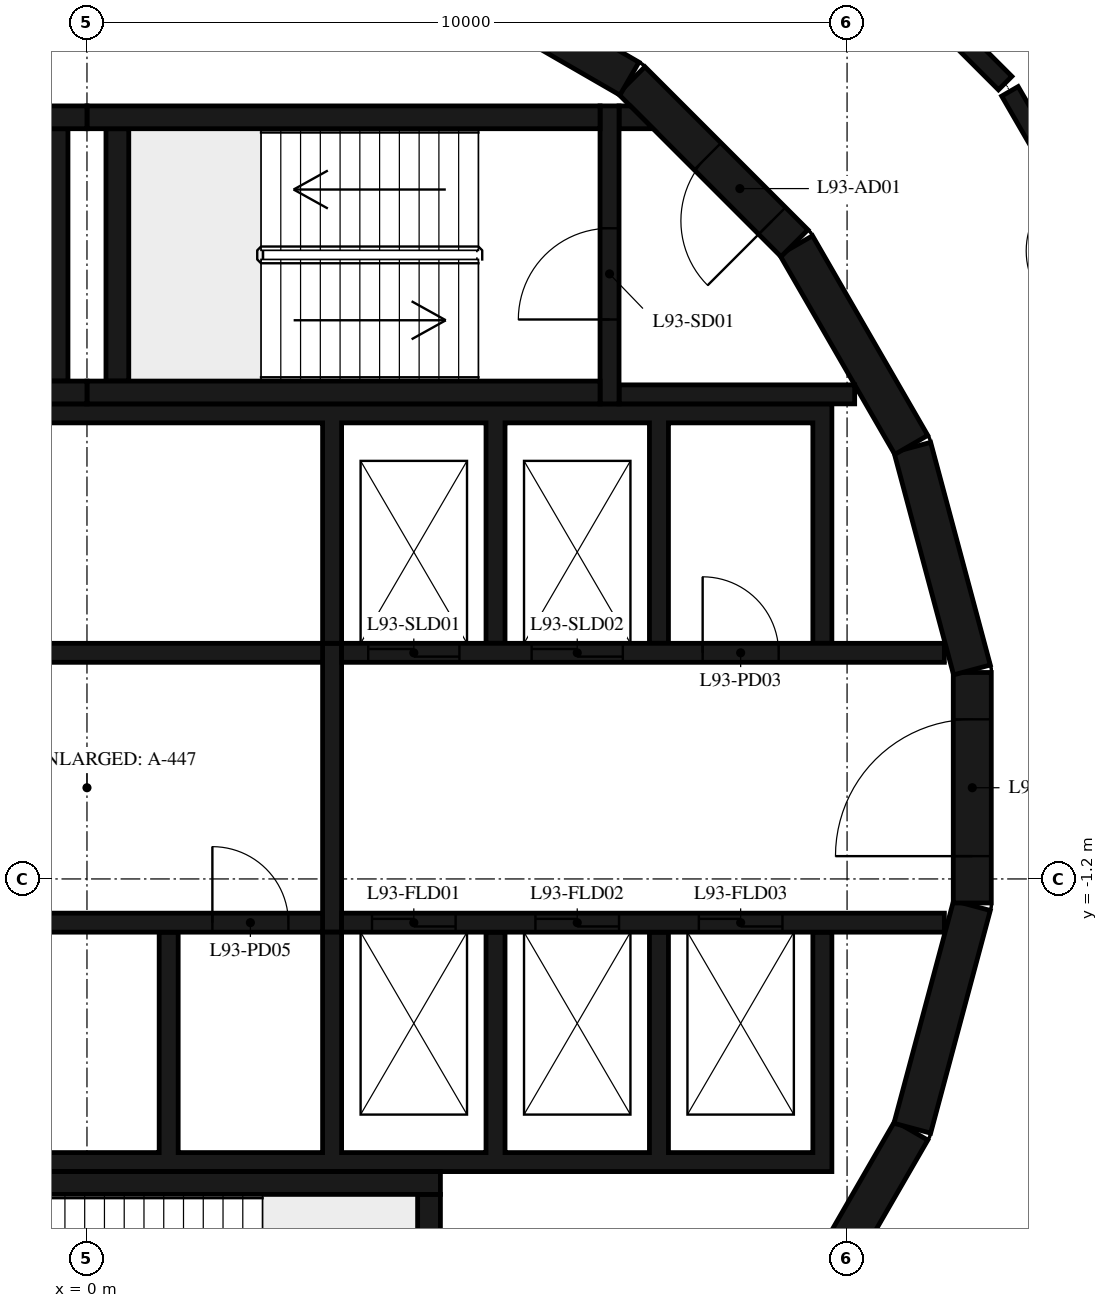
"""IFC4 building model, lengths in metres.
Left out: names, types, materials, properties, quantities, classifications, styles, units other than length and angle.
Written with IfcOpenShell. Run it as: python <this file> out.ifc"""

import sys

from ifc_helpers import new_model, si_unit, direction, frame, frame_2d, origin, place, context, subcontext, project, spatial, polyline, rectangle, outline, extrude, element, fill, save


model = new_model("IFC4")
c1 = context("Model", 3, precision=1e-05, world=origin(), true_north=direction((0.0, 1.0)))
c2 = subcontext(c1, "Body", "Model", "MODEL_VIEW")
j1 = project(units=[si_unit("LENGTHUNIT", "METRE"), si_unit("PLANEANGLEUNIT", "RADIAN")], contexts=[c1])
p1 = place(None, origin())
s1 = spatial("IfcSite", under=j1, at=p1, CompositionType="ELEMENT")
p2 = place(p1, origin())
s2 = spatial("IfcBuilding", under=s1, at=p2, CompositionType="ELEMENT")
p3 = place(p2, frame((0.0, 0.0, 361.0)))
s3 = spatial("IfcBuildingStorey", under=s2, at=p3, CompositionType="ELEMENT", Elevation=361.0)
for number, where, z_axis, x_axis in (
    (1, (9.329, -7.137, 0.0), (0.0, 0.0, 1.0), (0.5, 0.866, 0.0)),
    (2, (10.858, -4.479, 0.0), (0.0, 0.0, 1.0), (0.259, 0.966, 0.0)),
):
    element("IfcWall", number, at=place(p3, frame(where, z_axis=z_axis, x_axis=x_axis)), inside=s3, PredefinedType="SHEAR", context=c2, shape_type="SweptSolid", body=[
        extrude(rectangle(XDim=3.033, YDim=0.5, at=frame_2d((1.516, 0.0))), origin(), (0.0, 0.0, 1.0), 4.82),
    ])
p4 = place(p3, frame((11.647, -1.516, 0.0), z_axis=(0.0, 0.0, 1.0), x_axis=(0.0, 1.0, 0.0)))
e3 = element("IfcWall", 3, at=p4, inside=s3, PredefinedType="SHEAR", context=c2, shape_type="SweptSolid", body=[
    extrude(rectangle(XDim=3.033, YDim=0.5, at=frame_2d((1.516, 0.0))), origin(), (0.0, 0.0, 1.0), 4.82),
])
p5 = place(p4, frame((0.616, 0.0, 0.0)))
e4 = element("IfcOpeningElement", 4, at=p5, cuts=e3, PredefinedType="OPENING", context=c2, shape_type="SweptSolid", body=[
    extrude(rectangle(XDim=1.8, YDim=2.1, at=frame_2d((0.9, 1.05))), frame((0.0, 0.26, 0.0), z_axis=(0.0, -1.0, 0.0), x_axis=(1.0, 0.0, 0.0)), (0.0, 0.0, 1.0), 0.52),
])
for number, where, z_axis, x_axis in (
    (5, (11.643, 1.55, 0.0), (0.0, 0.0, 1.0), (-0.259, 0.966, 0.0)),
    (6, (10.845, 4.51, 0.0), (0.0, 0.0, 1.0), (-0.5, 0.866, 0.0)),
):
    element("IfcWall", number, at=place(p3, frame(where, z_axis=z_axis, x_axis=x_axis)), inside=s3, PredefinedType="SHEAR", context=c2, shape_type="SweptSolid", body=[
        extrude(rectangle(XDim=3.033, YDim=0.5, at=frame_2d((1.516, 0.0))), origin(), (0.0, 0.0, 1.0), 4.82),
    ])
p6 = place(p3, frame((9.308, 7.164, 0.0), z_axis=(0.0, 0.0, 1.0), x_axis=(-0.707106781187, 0.707106781187, 0.0)))
e7 = element("IfcWall", 7, at=p6, inside=s3, PredefinedType="SHEAR", context=c2, shape_type="SweptSolid", body=[
    extrude(rectangle(XDim=3.032, YDim=0.5, at=frame_2d((1.516, 0.0))), origin(), (0.0, 0.0, 1.0), 4.82),
])
p7 = place(p6, frame((0.416, 0.0, 0.0)))
e8 = element("IfcOpeningElement", 8, at=p7, cuts=e7, PredefinedType="OPENING", context=c2, shape_type="SweptSolid", body=[
    extrude(rectangle(XDim=1.2, YDim=2.1, at=frame_2d((0.6, 1.05))), frame((0.0, 0.26, 0.0), z_axis=(0.0, -1.0, 0.0), x_axis=(1.0, 0.0, 0.0)), (0.0, 0.0, 1.0), 0.52),
])
p8 = place(p3, frame((7.137, 9.329, 0.0), z_axis=(0.0, 0.0, 1.0), x_axis=(-0.865975092491, 0.500087131594, 0.0)))
e9 = element("IfcWall", 9, at=p8, inside=s3, PredefinedType="SHEAR", context=c2, shape_type="SweptSolid", body=[
    extrude(rectangle(XDim=3.033, YDim=0.5, at=frame_2d((1.516, 0.0))), origin(), (0.0, 0.0, 1.0), 4.82),
])
for number, where, z_axis, x_axis in (
    (10, (0.0, 5.2, 0.0), (0.0, 0.0, 1.0), (1.0, 0.0, 0.0)),
    (11, (0.0, 8.82, 0.0), (0.0, 0.0, 1.0), (1.0, 0.0, 0.0)),
):
    element("IfcWall", number, at=place(p3, frame(where, z_axis=z_axis, x_axis=x_axis)), inside=s3, PredefinedType="SHEAR", context=c2, shape_type="SweptSolid", body=[
        extrude(rectangle(XDim=6.75, YDim=0.3, at=frame_2d((3.375, 0.0))), origin(), (0.0, 0.0, 1.0), 4.82),
    ])
p9 = place(p3, frame((0.4, 5.35, 0.0), z_axis=(0.0, 0.0, 1.0), x_axis=(0.0, 1.0, 0.0)))
e12 = element("IfcWall", 12, at=p9, inside=s3, PredefinedType="SHEAR", context=c2, shape_type="SweptSolid", body=[
    extrude(rectangle(XDim=3.32, YDim=0.3, at=frame_2d((1.66, 0.0))), origin(), (0.0, 0.0, 1.0), 4.82),
])
p10 = place(p3, frame((6.875, 5.05, 0.0), z_axis=(0.0, 0.0, 1.0), x_axis=(0.0, 1.0, 0.0)))
e13 = element("IfcWall", 13, at=p10, inside=s3, PredefinedType="SHEAR", context=c2, shape_type="SweptSolid", body=[
    extrude(rectangle(XDim=3.92, YDim=0.25, at=frame_2d((1.96, 0.0))), origin(), (0.0, 0.0, 1.0), 4.82),
])
p11 = place(p10, frame((1.11, 0.0, 0.0)))
e14 = element("IfcOpeningElement", 14, at=p11, cuts=e13, PredefinedType="OPENING", context=c2, shape_type="SweptSolid", body=[
    extrude(rectangle(XDim=1.2, YDim=2.1, at=frame_2d((0.6, 1.05))), frame((0.0, 0.135, 0.0), z_axis=(0.0, -1.0, 0.0), x_axis=(1.0, 0.0, 0.0)), (0.0, 0.0, 1.0), 0.27),
])
p12 = place(p3, frame((7.0, 5.175, 0.0), z_axis=(0.0, 0.0, 1.0), x_axis=(1.0, 0.0, 0.0)))
e15 = element("IfcWall", 15, at=p12, inside=s3, PredefinedType="SHEAR", context=c2, shape_type="SweptSolid", body=[
    extrude(rectangle(XDim=3.1, YDim=0.25, at=frame_2d((1.55, 0.0))), origin(), (0.0, 0.0, 1.0), 4.82),
])
p13 = place(p3, origin())
e16 = element("IfcWall", 16, at=p13, inside=s3, PredefinedType="SHEAR", context=c2, shape_type="SweptSolid", body=[
    extrude(outline(polyline([(7.448, 8.67), (7.0, 8.67), (7.0, 8.97), (7.148, 8.97), (7.448, 8.67)])), origin(), (0.0, 0.0, 1.0), 4.82),
])
for number, where, z_axis, x_axis in (
    (17, (-6.75, 5.2, 0.0), (0.0, 0.0, 1.0), (1.0, 0.0, 0.0)),
    (18, (-6.75, 8.82, 0.0), (0.0, 0.0, 1.0), (1.0, 0.0, 0.0)),
):
    element("IfcWall", number, at=place(p3, frame(where, z_axis=z_axis, x_axis=x_axis)), inside=s3, PredefinedType="SHEAR", context=c2, shape_type="SweptSolid", body=[
        extrude(rectangle(XDim=6.75, YDim=0.3, at=frame_2d((3.375, 0.0))), origin(), (0.0, 0.0, 1.0), 4.82),
    ])
p14 = place(p3, frame((-0.4, 5.35, 0.0), z_axis=(0.0, 0.0, 1.0), x_axis=(0.0, 1.0, 0.0)))
e19 = element("IfcWall", 19, at=p14, inside=s3, PredefinedType="SHEAR", context=c2, shape_type="SweptSolid", body=[
    extrude(rectangle(XDim=3.32, YDim=0.3, at=frame_2d((1.66, 0.0))), origin(), (0.0, 0.0, 1.0), 4.82),
])
p15 = place(p3, frame((-2.4, -5.2, 0.0), z_axis=(0.0, 0.0, 1.0), x_axis=(1.0, 0.0, 0.0)))
e20 = element("IfcWall", 20, at=p15, inside=s3, PredefinedType="SHEAR", context=c2, shape_type="SweptSolid", body=[
    extrude(rectangle(XDim=7.05, YDim=0.3, at=frame_2d((3.525, 0.0))), origin(), (0.0, 0.0, 1.0), 4.82),
])
p16 = place(p3, frame((4.5, -8.67, 0.0), z_axis=(0.0, 0.0, 1.0), x_axis=(0.0, 1.0, 0.0)))
e21 = element("IfcWall", 21, at=p16, inside=s3, PredefinedType="SHEAR", context=c2, shape_type="SweptSolid", body=[
    extrude(rectangle(XDim=3.32, YDim=0.3, at=frame_2d((1.66, 0.0))), origin(), (0.0, 0.0, 1.0), 4.82),
])
p17 = place(p3, origin())
e22 = element("IfcWall", 22, at=p17, inside=s3, PredefinedType="SHEAR", context=c2, shape_type="SweptSolid", body=[
    extrude(outline(polyline([(-9.8, 1.9), (-9.55, 1.9), (-9.55, 4.8), (-5.5, 4.8), (-5.5, 1.9), (-5.25, 1.9), (-5.25, 4.8), (3.1, 4.8), (3.1, 1.9), (3.35, 1.9), (3.35, 4.8), (5.25, 4.8), (5.25, 1.9), (5.5, 1.9), (5.5, 4.8), (7.4, 4.8), (7.4, 1.9), (7.65, 1.9), (7.65, 4.8), (9.55, 4.8), (9.55, 1.9), (9.8, 1.9), (9.8, 4.8), (9.8, 5.05), (-9.8, 5.05), (-9.8, 4.8), (-9.8, 1.9)])), origin(), (0.0, 0.0, 1.0), 4.82),
])
p18 = place(p3, origin())
e23 = element("IfcWall", 23, at=p18, inside=s3, PredefinedType="SHEAR", context=c2, shape_type="SweptSolid", body=[
    extrude(outline(polyline([(9.8, -5.05), (9.8, -4.8), (9.8, -1.9), (9.55, -1.9), (9.55, -4.8), (7.65, -4.8), (7.65, -1.9), (7.4, -1.9), (7.4, -4.8), (5.5, -4.8), (5.5, -1.9), (5.25, -1.9), (5.25, -4.8), (3.35, -4.8), (3.35, -1.9), (3.1, -1.9), (3.1, -4.8), (1.2, -4.8), (1.2, -1.9), (0.95, -1.9), (0.95, -4.8), (-0.95, -4.8), (-0.95, -1.9), (-1.2, -1.9), (-1.2, -4.8), (-3.1, -4.8), (-3.1, -1.9), (-3.35, -1.9), (-3.35, -4.8), (-5.25, -4.8), (-5.25, -1.9), (-5.5, -1.9), (-5.5, -4.8), (-9.55, -4.8), (-9.55, -1.9), (-9.8, -1.9), (-9.8, -4.8), (-9.8, -5.05), (9.8, -5.05)])), origin(), (0.0, 0.0, 1.0), 4.82),
])
p19 = place(p3, frame((-11.28, 1.775, 0.0), z_axis=(0.0, 0.0, 1.0), x_axis=(1.0, 0.0, 0.0)))
e24 = element("IfcWall", 24, at=p19, inside=s3, PredefinedType="SHEAR", context=c2, shape_type="SweptSolid", body=[
    extrude(rectangle(XDim=14.38, YDim=0.25, at=frame_2d((7.19, 0.0))), origin(), (0.0, 0.0, 1.0), 4.82),
])
p20 = place(p19, frame((3.255, 0.0, 0.0)))
e25 = element("IfcOpeningElement", 25, at=p20, cuts=e24, PredefinedType="OPENING", context=c2, shape_type="SweptSolid", body=[
    extrude(rectangle(XDim=1.0, YDim=2.4, at=frame_2d((0.5, 1.2))), frame((0.0, 0.135, 0.0), z_axis=(0.0, -1.0, 0.0), x_axis=(1.0, 0.0, 0.0)), (0.0, 0.0, 1.0), 0.27),
])
p21 = place(p19, frame((9.705, 0.0, 0.0)))
e26 = element("IfcOpeningElement", 26, at=p21, cuts=e24, PredefinedType="OPENING", context=c2, shape_type="SweptSolid", body=[
    extrude(rectangle(XDim=1.0, YDim=2.4, at=frame_2d((0.5, 1.2))), frame((0.0, 0.135, 0.0), z_axis=(0.0, -1.0, 0.0), x_axis=(1.0, 0.0, 0.0)), (0.0, 0.0, 1.0), 0.27),
])
p22 = place(p3, frame((3.35, 1.775, 0.0), z_axis=(0.0, 0.0, 1.0), x_axis=(1.0, 0.0, 0.0)))
e27 = element("IfcWall", 27, at=p22, inside=s3, PredefinedType="SHEAR", context=c2, shape_type="SweptSolid", body=[
    extrude(rectangle(XDim=7.93, YDim=0.25, at=frame_2d((3.965, 0.0))), origin(), (0.0, 0.0, 1.0), 4.82),
])
p23 = place(p22, frame((0.35, 0.0, 0.0)))
e28 = element("IfcOpeningElement", 28, at=p23, cuts=e27, PredefinedType="OPENING", context=c2, shape_type="SweptSolid", body=[
    extrude(rectangle(XDim=1.2, YDim=2.4, at=frame_2d((0.6, 1.2))), frame((0.0, 0.135, 0.0), z_axis=(0.0, -1.0, 0.0), x_axis=(1.0, 0.0, 0.0)), (0.0, 0.0, 1.0), 0.27),
])
p24 = place(p22, frame((2.5, 0.0, 0.0)))
e29 = element("IfcOpeningElement", 29, at=p24, cuts=e27, PredefinedType="OPENING", context=c2, shape_type="SweptSolid", body=[
    extrude(rectangle(XDim=1.2, YDim=2.4, at=frame_2d((0.6, 1.2))), frame((0.0, 0.135, 0.0), z_axis=(0.0, -1.0, 0.0), x_axis=(1.0, 0.0, 0.0)), (0.0, 0.0, 1.0), 0.27),
])
p25 = place(p22, frame((4.75, 0.0, 0.0)))
e30 = element("IfcOpeningElement", 30, at=p25, cuts=e27, PredefinedType="OPENING", context=c2, shape_type="SweptSolid", body=[
    extrude(rectangle(XDim=1.0, YDim=2.4, at=frame_2d((0.5, 1.2))), frame((0.0, 0.135, 0.0), z_axis=(0.0, -1.0, 0.0), x_axis=(1.0, 0.0, 0.0)), (0.0, 0.0, 1.0), 0.27),
])
p26 = place(p3, frame((-11.28, -1.775, 0.0), z_axis=(0.0, 0.0, 1.0), x_axis=(1.0, 0.0, 0.0)))
e31 = element("IfcWall", 31, at=p26, inside=s3, PredefinedType="SHEAR", context=c2, shape_type="SweptSolid", body=[
    extrude(rectangle(XDim=14.38, YDim=0.25, at=frame_2d((7.19, 0.0))), origin(), (0.0, 0.0, 1.0), 4.82),
])
p27 = place(p26, frame((3.255, 0.0, 0.0)))
e32 = element("IfcOpeningElement", 32, at=p27, cuts=e31, PredefinedType="OPENING", context=c2, shape_type="SweptSolid", body=[
    extrude(rectangle(XDim=1.0, YDim=2.4, at=frame_2d((0.5, 1.2))), frame((0.0, 0.135, 0.0), z_axis=(0.0, -1.0, 0.0), x_axis=(1.0, 0.0, 0.0)), (0.0, 0.0, 1.0), 0.27),
])
p28 = place(p26, frame((12.93, 0.0, 0.0)))
e33 = element("IfcOpeningElement", 33, at=p28, cuts=e31, PredefinedType="OPENING", context=c2, shape_type="SweptSolid", body=[
    extrude(rectangle(XDim=1.0, YDim=2.4, at=frame_2d((0.5, 1.2))), frame((0.0, 0.135, 0.0), z_axis=(0.0, -1.0, 0.0), x_axis=(1.0, 0.0, 0.0)), (0.0, 0.0, 1.0), 0.27),
])
p29 = place(p3, frame((3.35, -1.775, 0.0), z_axis=(0.0, 0.0, 1.0), x_axis=(1.0, 0.0, 0.0)))
e34 = element("IfcWall", 34, at=p29, inside=s3, PredefinedType="SHEAR", context=c2, shape_type="SweptSolid", body=[
    extrude(rectangle(XDim=7.93, YDim=0.25, at=frame_2d((3.965, 0.0))), origin(), (0.0, 0.0, 1.0), 4.82),
])
p30 = place(p29, frame((0.4, 0.0, 0.0)))
e35 = element("IfcOpeningElement", 35, at=p30, cuts=e34, PredefinedType="OPENING", context=c2, shape_type="SweptSolid", body=[
    extrude(rectangle(XDim=1.1, YDim=2.4, at=frame_2d((0.55, 1.2))), frame((0.0, 0.135, 0.0), z_axis=(0.0, -1.0, 0.0), x_axis=(1.0, 0.0, 0.0)), (0.0, 0.0, 1.0), 0.27),
])
p31 = place(p29, frame((2.55, 0.0, 0.0)))
e36 = element("IfcOpeningElement", 36, at=p31, cuts=e34, PredefinedType="OPENING", context=c2, shape_type="SweptSolid", body=[
    extrude(rectangle(XDim=1.1, YDim=2.4, at=frame_2d((0.55, 1.2))), frame((0.0, 0.135, 0.0), z_axis=(0.0, -1.0, 0.0), x_axis=(1.0, 0.0, 0.0)), (0.0, 0.0, 1.0), 0.27),
])
p32 = place(p29, frame((4.7, 0.0, 0.0)))
e37 = element("IfcOpeningElement", 37, at=p32, cuts=e34, PredefinedType="OPENING", context=c2, shape_type="SweptSolid", body=[
    extrude(rectangle(XDim=1.1, YDim=2.4, at=frame_2d((0.55, 1.2))), frame((0.0, 0.135, 0.0), z_axis=(0.0, -1.0, 0.0), x_axis=(1.0, 0.0, 0.0)), (0.0, 0.0, 1.0), 0.27),
])
p33 = place(p3, frame((3.225, -1.9, 0.0), z_axis=(0.0, 0.0, 1.0), x_axis=(0.0, 1.0, 0.0)))
e38 = element("IfcWall", 38, at=p33, inside=s3, PredefinedType="SHEAR", context=c2, shape_type="SweptSolid", body=[
    extrude(rectangle(XDim=3.8, YDim=0.25, at=frame_2d((1.9, 0.0))), origin(), (0.0, 0.0, 1.0), 4.82),
])
p34 = place(p3, frame((12.143, -9.162, 0.0), z_axis=(0.0, 0.0, 1.0), x_axis=(0.500756218026, 0.865588360659, 0.0)))
e39 = element("IfcWall", 39, at=p34, inside=s3, PredefinedType="PARTITIONING", context=c2, shape_type="SweptSolid", body=[
    extrude(rectangle(XDim=3.849, YDim=0.25, at=frame_2d((1.925, 0.0))), origin(), (0.0, 0.0, 1.0), 4.82),
])
p35 = place(p3, frame((12.08, 9.27, 0.0), z_axis=(0.0, 0.0, 1.0), x_axis=(-0.707106781187, 0.707106781187, 0.0)))
e40 = element("IfcWall", 40, at=p35, inside=s3, PredefinedType="PARTITIONING", context=c2, shape_type="SweptSolid", body=[
    extrude(rectangle(XDim=2.249, YDim=0.25, at=frame_2d((1.125, 0.0))), origin(), (0.0, 0.0, 1.0), 4.82),
])
p36 = place(p3, frame((14.07, 5.83, 0.0), z_axis=(0.0, 0.0, 1.0), x_axis=(-0.500756218026, 0.865588360659, 0.0)))
e41 = element("IfcWall", 41, at=p36, inside=s3, PredefinedType="PARTITIONING", context=c2, shape_type="SweptSolid", body=[
    extrude(rectangle(XDim=3.849, YDim=0.25, at=frame_2d((1.925, 0.0))), origin(), (0.0, 0.0, 1.0), 4.82),
])
p37 = place(p36, frame((1.425, 0.0, 0.0)))
e42 = element("IfcOpeningElement", 42, at=p37, cuts=e41, PredefinedType="OPENING", context=c2, shape_type="SweptSolid", body=[
    extrude(rectangle(XDim=1.0, YDim=2.1, at=frame_2d((0.5, 1.05))), frame((0.0, 0.135, 0.0), z_axis=(0.0, -1.0, 0.0), x_axis=(1.0, 0.0, 0.0)), (0.0, 0.0, 1.0), 0.27),
])
p38 = place(p11, origin())
e43 = element("IfcDoor", 43, at=p38, inside=s3, OperationType="SINGLE_SWING_LEFT", PredefinedType="DOOR", context=c2, shape_type="SweptSolid", body=[
    extrude(rectangle(XDim=1.2, YDim=2.1, at=frame_2d((0.6, 1.05))), frame((0.0, 0.025, 0.0), z_axis=(0.0, -1.0, 0.0), x_axis=(1.0, 0.0, 0.0)), (0.0, 0.0, 1.0), 0.05),
])
fill(e14, e43)
p39 = place(p7, origin())
e44 = element("IfcDoor", 44, at=p39, inside=s3, OperationType="SINGLE_SWING_RIGHT", PredefinedType="DOOR", context=c2, shape_type="SweptSolid", body=[
    extrude(rectangle(XDim=1.2, YDim=2.1, at=frame_2d((0.6, 1.05))), frame((0.0, 0.025, 0.0), z_axis=(0.0, -1.0, 0.0), x_axis=(1.0, 0.0, 0.0)), (0.0, 0.0, 1.0), 0.05),
])
fill(e8, e44)
p40 = place(p5, origin())
e45 = element("IfcDoor", 45, at=p40, inside=s3, OperationType="DOUBLE_DOOR_SINGLE_SWING", PredefinedType="DOOR", context=c2, shape_type="SweptSolid", body=[
    extrude(rectangle(XDim=1.8, YDim=2.1, at=frame_2d((0.9, 1.05))), frame((0.0, 0.025, 0.0), z_axis=(0.0, -1.0, 0.0), x_axis=(1.0, 0.0, 0.0)), (0.0, 0.0, 1.0), 0.05),
])
fill(e4, e45)
p41 = place(p23, origin())
e46 = element("IfcDoor", 46, at=p41, inside=s3, OperationType="DOUBLE_DOOR_SLIDING", PredefinedType="DOOR", context=c2, shape_type="SweptSolid", body=[
    extrude(rectangle(XDim=1.2, YDim=2.4, at=frame_2d((0.6, 1.2))), frame((0.0, 0.025, 0.0), z_axis=(0.0, -1.0, 0.0), x_axis=(1.0, 0.0, 0.0)), (0.0, 0.0, 1.0), 0.05),
])
fill(e28, e46)
p42 = place(p24, origin())
e47 = element("IfcDoor", 47, at=p42, inside=s3, OperationType="DOUBLE_DOOR_SLIDING", PredefinedType="DOOR", context=c2, shape_type="SweptSolid", body=[
    extrude(rectangle(XDim=1.2, YDim=2.4, at=frame_2d((0.6, 1.2))), frame((0.0, 0.025, 0.0), z_axis=(0.0, -1.0, 0.0), x_axis=(1.0, 0.0, 0.0)), (0.0, 0.0, 1.0), 0.05),
])
fill(e29, e47)
p43 = place(p30, origin())
e48 = element("IfcDoor", 48, at=p43, inside=s3, OperationType="DOUBLE_DOOR_SLIDING", PredefinedType="DOOR", context=c2, shape_type="SweptSolid", body=[
    extrude(rectangle(XDim=1.1, YDim=2.4, at=frame_2d((0.55, 1.2))), frame((0.0, 0.025, 0.0), z_axis=(0.0, -1.0, 0.0), x_axis=(1.0, 0.0, 0.0)), (0.0, 0.0, 1.0), 0.05),
])
fill(e35, e48)
p44 = place(p31, origin())
e49 = element("IfcDoor", 49, at=p44, inside=s3, OperationType="DOUBLE_DOOR_SLIDING", PredefinedType="DOOR", context=c2, shape_type="SweptSolid", body=[
    extrude(rectangle(XDim=1.1, YDim=2.4, at=frame_2d((0.55, 1.2))), frame((0.0, 0.025, 0.0), z_axis=(0.0, -1.0, 0.0), x_axis=(1.0, 0.0, 0.0)), (0.0, 0.0, 1.0), 0.05),
])
fill(e36, e49)
p45 = place(p32, origin())
e50 = element("IfcDoor", 50, at=p45, inside=s3, OperationType="DOUBLE_DOOR_SLIDING", PredefinedType="DOOR", context=c2, shape_type="SweptSolid", body=[
    extrude(rectangle(XDim=1.1, YDim=2.4, at=frame_2d((0.55, 1.2))), frame((0.0, 0.025, 0.0), z_axis=(0.0, -1.0, 0.0), x_axis=(1.0, 0.0, 0.0)), (0.0, 0.0, 1.0), 0.05),
])
fill(e37, e50)
p46 = place(p25, origin())
e51 = element("IfcDoor", 51, at=p46, inside=s3, OperationType="SINGLE_SWING_RIGHT", PredefinedType="DOOR", context=c2, shape_type="SweptSolid", body=[
    extrude(rectangle(XDim=1.0, YDim=2.4, at=frame_2d((0.5, 1.2))), frame((0.0, 0.025, 0.0), z_axis=(0.0, -1.0, 0.0), x_axis=(1.0, 0.0, 0.0)), (0.0, 0.0, 1.0), 0.05),
])
fill(e30, e51)
p47 = place(p28, origin())
e52 = element("IfcDoor", 52, at=p47, inside=s3, OperationType="SINGLE_SWING_RIGHT", PredefinedType="DOOR", context=c2, shape_type="SweptSolid", body=[
    extrude(rectangle(XDim=1.0, YDim=2.4, at=frame_2d((0.5, 1.2))), frame((0.0, 0.025, 0.0), z_axis=(0.0, -1.0, 0.0), x_axis=(1.0, 0.0, 0.0)), (0.0, 0.0, 1.0), 0.05),
])
fill(e33, e52)
save(model, sys.argv[1])
